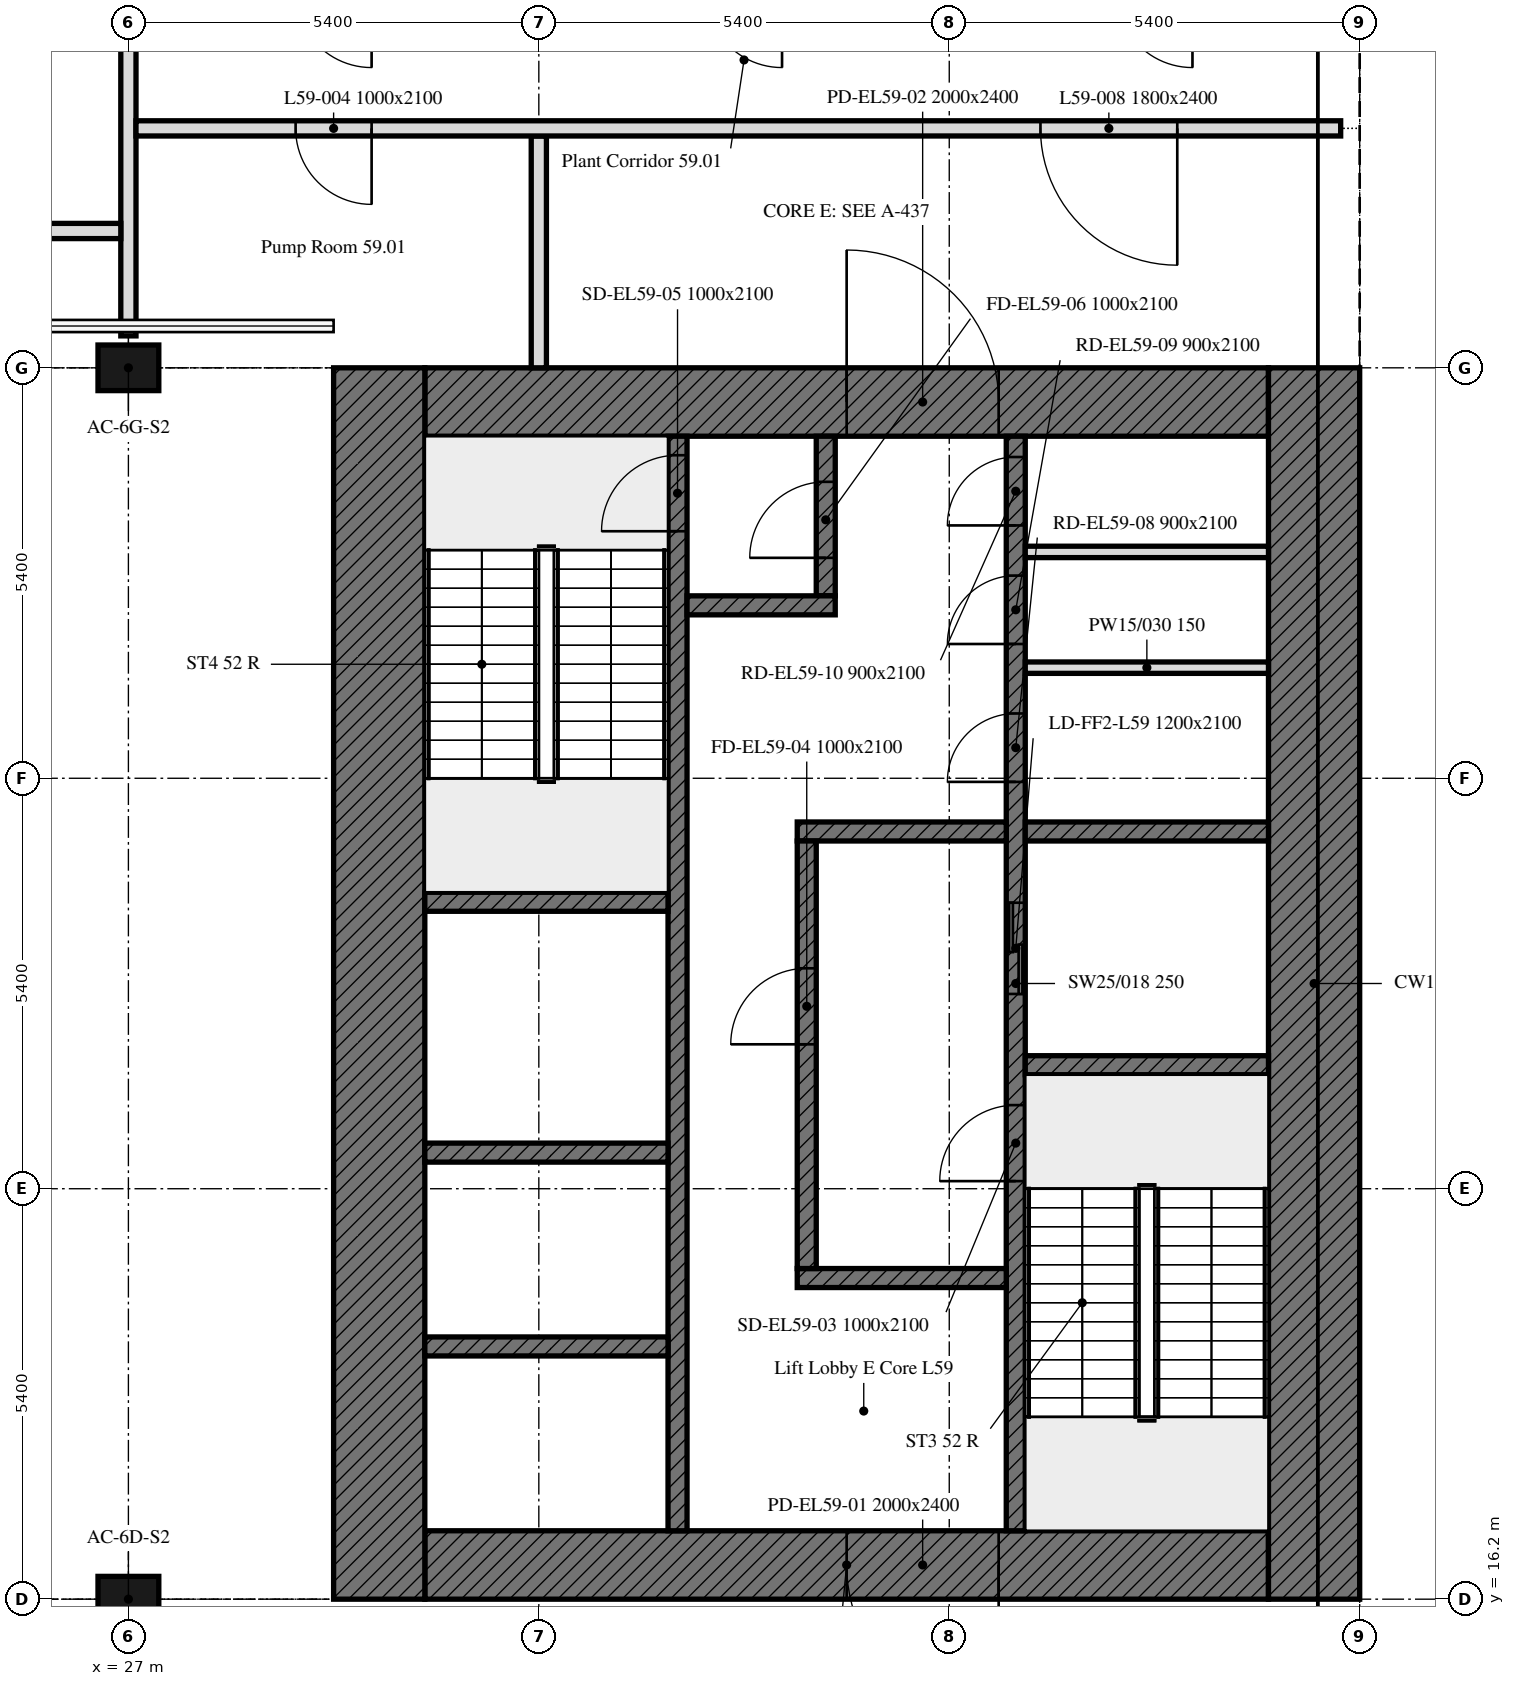
"""IFC4 building model, lengths in metres.
Left out: names, types, materials, properties, quantities, classifications, styles, units other than length and angle.
Written with IfcOpenShell. Run it as: python <this file> out.ifc"""

import sys

from ifc_helpers import new_model, si_unit, direction, frame, frame_2d, origin, origin_2d, place, context, subcontext, project, spatial, rectangle, extrude, element, fill, save


model = new_model("IFC4")
c1 = context("Model", 3, precision=1e-05, world=origin(), true_north=direction((0.0, 1.0)))
c2 = subcontext(c1, "Body", "Model", "MODEL_VIEW")
j1 = project(units=[si_unit("LENGTHUNIT", "METRE"), si_unit("PLANEANGLEUNIT", "RADIAN")], contexts=[c1])
p1 = place(None, origin())
s1 = spatial("IfcSite", under=j1, at=p1, CompositionType="ELEMENT")
p2 = place(p1, origin())
s2 = spatial("IfcBuilding", under=s1, at=p2, CompositionType="ELEMENT")
p3 = place(p2, frame((0.0, 0.0, 233.5)))
s3 = spatial("IfcBuildingStorey", under=s2, at=p3, CompositionType="ELEMENT", Elevation=233.5)
for number, where, z_axis, x_axis in (
    (1, (27.0, 16.2, 0.0), (0.0, 0.0, 1.0), (1.0, 0.0, 0.0)),
    (2, (27.0, 32.4, 0.0), (0.0, 0.0, 1.0), (1.0, 0.0, 0.0)),
):
    element("IfcColumn", number, at=place(p3, frame(where, z_axis=z_axis, x_axis=x_axis)), inside=s3, PredefinedType="COLUMN", context=c2, shape_type="SweptSolid", body=[
        extrude(rectangle(XDim=0.8, YDim=0.6, at=origin_2d()), origin(), (0.0, 0.0, 1.0), 9.3),
    ])
p4 = place(p3, frame((42.0, 16.65, 0.0), z_axis=(0.0, 0.0, 1.0), x_axis=(-1.0, 0.0, 0.0)))
e3 = element("IfcWall", 3, at=p4, inside=s3, PredefinedType="SOLIDWALL", context=c2, shape_type="SweptSolid", body=[
    extrude(rectangle(XDim=11.1, YDim=0.9, at=frame_2d((5.55, 0.0))), origin(), (0.0, 0.0, 1.0), 9.3),
])
p5 = place(p4, frame((3.55, 0.0, 0.0)))
e4 = element("IfcOpeningElement", 4, at=p5, cuts=e3, PredefinedType="OPENING", context=c2, shape_type="SweptSolid", body=[
    extrude(rectangle(XDim=2.0, YDim=2.4, at=frame_2d((1.0, 1.2))), frame((0.0, 0.45, 0.0), z_axis=(0.0, -1.0, 0.0), x_axis=(1.0, 0.0, 0.0)), (0.0, 0.0, 1.0), 0.9),
])
p6 = place(p3, frame((30.9, 31.95, 0.0), z_axis=(0.0, 0.0, 1.0), x_axis=(1.0, 0.0, 0.0)))
e5 = element("IfcWall", 5, at=p6, inside=s3, PredefinedType="SOLIDWALL", context=c2, shape_type="SweptSolid", body=[
    extrude(rectangle(XDim=11.1, YDim=0.9, at=frame_2d((5.55, 0.0))), origin(), (0.0, 0.0, 1.0), 9.3),
])
p7 = place(p6, frame((5.55, 0.0, 0.0)))
e6 = element("IfcOpeningElement", 6, at=p7, cuts=e5, PredefinedType="OPENING", context=c2, shape_type="SweptSolid", body=[
    extrude(rectangle(XDim=2.0, YDim=2.4, at=frame_2d((1.0, 1.2))), frame((0.0, 0.45, 0.0), z_axis=(0.0, -1.0, 0.0), x_axis=(1.0, 0.0, 0.0)), (0.0, 0.0, 1.0), 0.9),
])
for number, where, z_axis, x_axis in (
    (7, (42.6, 32.4, 0.0), (0.0, 0.0, 1.0), (0.0, -1.0, 0.0)),
    (8, (30.3, 16.2, 0.0), (0.0, 0.0, 1.0), (0.0, 1.0, 0.0)),
):
    element("IfcWall", number, at=place(p3, frame(where, z_axis=z_axis, x_axis=x_axis)), inside=s3, PredefinedType="SOLIDWALL", context=c2, shape_type="SweptSolid", body=[
        extrude(rectangle(XDim=16.2, YDim=1.2, at=frame_2d((8.1, 0.0))), origin(), (0.0, 0.0, 1.0), 9.3),
    ])
p8 = place(p3, frame((38.675, 17.1, 0.0), z_axis=(0.0, 0.0, 1.0), x_axis=(0.0, 1.0, 0.0)))
e9 = element("IfcWall", 9, at=p8, inside=s3, PredefinedType="SOLIDWALL", context=c2, shape_type="SweptSolid", body=[
    extrude(rectangle(XDim=14.4, YDim=0.25, at=frame_2d((7.2, 0.0))), origin(), (0.0, 0.0, 1.0), 9.3),
])
p9 = place(p8, frame((4.6, 0.0, 0.0)))
e10 = element("IfcOpeningElement", 10, at=p9, cuts=e9, PredefinedType="OPENING", context=c2, shape_type="SweptSolid", body=[
    extrude(rectangle(XDim=1.0, YDim=2.1, at=frame_2d((0.5, 1.05))), frame((0.0, 0.125, 0.0), z_axis=(0.0, -1.0, 0.0), x_axis=(1.0, 0.0, 0.0)), (0.0, 0.0, 1.0), 0.25),
])
p10 = place(p8, frame((7.062, 0.0, 0.0)))
e11 = element("IfcOpeningElement", 11, at=p10, cuts=e9, PredefinedType="OPENING", context=c2, shape_type="SweptSolid", body=[
    extrude(rectangle(XDim=1.2, YDim=2.1, at=frame_2d((0.6, 1.05))), frame((0.0, 0.125, 0.0), z_axis=(0.0, -1.0, 0.0), x_axis=(1.0, 0.0, 0.0)), (0.0, 0.0, 1.0), 0.25),
])
p11 = place(p8, frame((9.853, 0.0, 0.0)))
e12 = element("IfcOpeningElement", 12, at=p11, cuts=e9, PredefinedType="OPENING", context=c2, shape_type="SweptSolid", body=[
    extrude(rectangle(XDim=0.9, YDim=2.1, at=frame_2d((0.45, 1.05))), frame((0.0, 0.125, 0.0), z_axis=(0.0, -1.0, 0.0), x_axis=(1.0, 0.0, 0.0)), (0.0, 0.0, 1.0), 0.25),
])
p12 = place(p8, frame((11.667, 0.0, 0.0)))
e13 = element("IfcOpeningElement", 13, at=p12, cuts=e9, PredefinedType="OPENING", context=c2, shape_type="SweptSolid", body=[
    extrude(rectangle(XDim=0.9, YDim=2.1, at=frame_2d((0.45, 1.05))), frame((0.0, 0.125, 0.0), z_axis=(0.0, -1.0, 0.0), x_axis=(1.0, 0.0, 0.0)), (0.0, 0.0, 1.0), 0.25),
])
p13 = place(p8, frame((13.227, 0.0, 0.0)))
e14 = element("IfcOpeningElement", 14, at=p13, cuts=e9, PredefinedType="OPENING", context=c2, shape_type="SweptSolid", body=[
    extrude(rectangle(XDim=0.9, YDim=2.1, at=frame_2d((0.45, 1.05))), frame((0.0, 0.125, 0.0), z_axis=(0.0, -1.0, 0.0), x_axis=(1.0, 0.0, 0.0)), (0.0, 0.0, 1.0), 0.25),
])
p14 = place(p3, frame((34.225, 17.1, 0.0), z_axis=(0.0, 0.0, 1.0), x_axis=(0.0, 1.0, 0.0)))
e15 = element("IfcWall", 15, at=p14, inside=s3, PredefinedType="SOLIDWALL", context=c2, shape_type="SweptSolid", body=[
    extrude(rectangle(XDim=14.4, YDim=0.25, at=frame_2d((7.2, 0.0))), origin(), (0.0, 0.0, 1.0), 9.3),
])
p15 = place(p14, frame((13.15, 0.0, 0.0)))
e16 = element("IfcOpeningElement", 16, at=p15, cuts=e15, PredefinedType="OPENING", context=c2, shape_type="SweptSolid", body=[
    extrude(rectangle(XDim=1.0, YDim=2.1, at=frame_2d((0.5, 1.05))), frame((0.0, 0.125, 0.0), z_axis=(0.0, -1.0, 0.0), x_axis=(1.0, 0.0, 0.0)), (0.0, 0.0, 1.0), 0.25),
])
p16 = place(p3, frame((38.8, 23.225, 0.0), z_axis=(0.0, 0.0, 1.0), x_axis=(1.0, 0.0, 0.0)))
e17 = element("IfcWall", 17, at=p16, inside=s3, PredefinedType="SOLIDWALL", context=c2, shape_type="SweptSolid", body=[
    extrude(rectangle(XDim=3.2, YDim=0.25, at=frame_2d((1.6, 0.0))), origin(), (0.0, 0.0, 1.0), 9.3),
])
for number, where, z_axis, x_axis in (
    (18, (30.9, 25.375, 0.0), (0.0, 0.0, 1.0), (1.0, 0.0, 0.0)),
    (19, (30.9, 22.075, 0.0), (0.0, 0.0, 1.0), (1.0, 0.0, 0.0)),
):
    element("IfcWall", number, at=place(p3, frame(where, z_axis=z_axis, x_axis=x_axis)), inside=s3, PredefinedType="SOLIDWALL", context=c2, shape_type="SweptSolid", body=[
        extrude(rectangle(XDim=3.2, YDim=0.25, at=frame_2d((1.6, 0.0))), origin(), (0.0, 0.0, 1.0), 9.3),
    ])
p17 = place(p3, frame((38.8, 26.3, 0.0), z_axis=(0.0, 0.0, 1.0), x_axis=(1.0, 0.0, 0.0)))
e20 = element("IfcWall", 20, at=p17, inside=s3, PredefinedType="SOLIDWALL", context=c2, shape_type="SweptSolid", body=[
    extrude(rectangle(XDim=3.2, YDim=0.25, at=frame_2d((1.6, 0.0))), origin(), (0.0, 0.0, 1.0), 9.3),
])
for number, where, z_axis, x_axis in (
    (21, (35.8, 26.3, 0.0), (0.0, 0.0, 1.0), (1.0, 0.0, 0.0)),
    (22, (35.8, 20.425, 0.0), (0.0, 0.0, 1.0), (1.0, 0.0, 0.0)),
):
    element("IfcWall", number, at=place(p3, frame(where, z_axis=z_axis, x_axis=x_axis)), inside=s3, PredefinedType="SOLIDWALL", context=c2, shape_type="SweptSolid", body=[
        extrude(rectangle(XDim=2.75, YDim=0.25, at=frame_2d((1.375, 0.0))), origin(), (0.0, 0.0, 1.0), 9.3),
    ])
p18 = place(p3, frame((36.175, 29.4, 0.0), z_axis=(0.0, 0.0, 1.0), x_axis=(0.0, 1.0, 0.0)))
e23 = element("IfcWall", 23, at=p18, inside=s3, PredefinedType="SOLIDWALL", context=c2, shape_type="SweptSolid", body=[
    extrude(rectangle(XDim=2.1, YDim=0.25, at=frame_2d((1.05, 0.0))), origin(), (0.0, 0.0, 1.0), 9.3),
])
p19 = place(p18, frame((0.5, 0.0, 0.0)))
e24 = element("IfcOpeningElement", 24, at=p19, cuts=e23, PredefinedType="OPENING", context=c2, shape_type="SweptSolid", body=[
    extrude(rectangle(XDim=1.0, YDim=2.1, at=frame_2d((0.5, 1.05))), frame((0.0, 0.125, 0.0), z_axis=(0.0, -1.0, 0.0), x_axis=(1.0, 0.0, 0.0)), (0.0, 0.0, 1.0), 0.25),
])
p20 = place(p3, frame((34.35, 29.275, 0.0), z_axis=(0.0, 0.0, 1.0), x_axis=(1.0, 0.0, 0.0)))
e25 = element("IfcWall", 25, at=p20, inside=s3, PredefinedType="SOLIDWALL", context=c2, shape_type="SweptSolid", body=[
    extrude(rectangle(XDim=1.95, YDim=0.25, at=frame_2d((0.975, 0.0))), origin(), (0.0, 0.0, 1.0), 9.3),
])
p21 = place(p3, frame((35.925, 20.55, 0.0), z_axis=(0.0, 0.0, 1.0), x_axis=(0.0, 1.0, 0.0)))
e26 = element("IfcWall", 26, at=p21, inside=s3, PredefinedType="SOLIDWALL", context=c2, shape_type="SweptSolid", body=[
    extrude(rectangle(XDim=5.625, YDim=0.25, at=frame_2d((2.812, 0.0))), origin(), (0.0, 0.0, 1.0), 9.3),
])
p22 = place(p21, frame((2.95, 0.0, 0.0)))
e27 = element("IfcOpeningElement", 27, at=p22, cuts=e26, PredefinedType="OPENING", context=c2, shape_type="SweptSolid", body=[
    extrude(rectangle(XDim=1.0, YDim=2.1, at=frame_2d((0.5, 1.05))), frame((0.0, 0.125, 0.0), z_axis=(0.0, -1.0, 0.0), x_axis=(1.0, 0.0, 0.0)), (0.0, 0.0, 1.0), 0.25),
])
p23 = place(p3, frame((30.9, 19.525, 0.0), z_axis=(0.0, 0.0, 1.0), x_axis=(1.0, 0.0, 0.0)))
e28 = element("IfcWall", 28, at=p23, inside=s3, PredefinedType="SOLIDWALL", context=c2, shape_type="SweptSolid", body=[
    extrude(rectangle(XDim=3.2, YDim=0.25, at=frame_2d((1.6, 0.0))), origin(), (0.0, 0.0, 1.0), 9.3),
])
for number, where, z_axis, x_axis in (
    (29, (38.8, 28.455, 0.0), (0.0, 0.0, 1.0), (1.0, 0.0, 0.0)),
    (30, (38.8, 29.978, 0.0), (0.0, 0.0, 1.0), (1.0, 0.0, 0.0)),
):
    element("IfcWall", number, at=place(p3, frame(where, z_axis=z_axis, x_axis=x_axis)), inside=s3, PredefinedType="PARTITIONING", context=c2, shape_type="SweptSolid", body=[
        extrude(rectangle(XDim=3.2, YDim=0.15, at=frame_2d((1.6, 0.0))), origin(), (0.0, 0.0, 1.0), 9.3),
    ])
p24 = place(p3, frame((32.4, 32.4, 0.0), z_axis=(0.0, 0.0, 1.0), x_axis=(0.0, 1.0, 0.0)))
e31 = element("IfcWall", 31, at=p24, inside=s3, PredefinedType="PARTITIONING", context=c2, shape_type="SweptSolid", body=[
    extrude(rectangle(XDim=3.05, YDim=0.2, at=frame_2d((1.525, 0.0))), origin(), (0.0, 0.0, 1.0), 9.3),
])
p25 = place(p3, frame((27.0, 37.25, 0.0), z_axis=(0.0, 0.0, 1.0), x_axis=(0.0, -1.0, 0.0)))
e32 = element("IfcWall", 32, at=p25, inside=s3, PredefinedType="PARTITIONING", context=c2, shape_type="SweptSolid", body=[
    extrude(rectangle(XDim=4.43, YDim=0.2, at=frame_2d((2.215, 0.0))), origin(), (0.0, 0.0, 1.0), 9.3),
])
p26 = place(p3, frame((42.95, 35.55, 0.0), z_axis=(0.0, 0.0, 1.0), x_axis=(-1.0, 0.0, 0.0)))
e33 = element("IfcWall", 33, at=p26, inside=s3, PredefinedType="PARTITIONING", context=c2, shape_type="SweptSolid", body=[
    extrude(rectangle(XDim=15.85, YDim=0.2, at=frame_2d((7.925, 0.0))), origin(), (0.0, 0.0, 1.0), 9.3),
])
p27 = place(p26, frame((12.75, 0.0, 0.0)))
e34 = element("IfcOpeningElement", 34, at=p27, cuts=e33, PredefinedType="OPENING", context=c2, shape_type="SweptSolid", body=[
    extrude(rectangle(XDim=1.0, YDim=2.1, at=frame_2d((0.5, 1.05))), frame((0.0, 0.1, 0.0), z_axis=(0.0, -1.0, 0.0), x_axis=(1.0, 0.0, 0.0)), (0.0, 0.0, 1.0), 0.2),
])
p28 = place(p26, frame((2.15, 0.0, 0.0)))
e35 = element("IfcOpeningElement", 35, at=p28, cuts=e33, PredefinedType="OPENING", context=c2, shape_type="SweptSolid", body=[
    extrude(rectangle(XDim=1.8, YDim=2.4, at=frame_2d((0.9, 1.2))), frame((0.0, 0.1, 0.0), z_axis=(0.0, -1.0, 0.0), x_axis=(1.0, 0.0, 0.0)), (0.0, 0.0, 1.0), 0.2),
])
p29 = place(p3, frame((26.9, 34.2, 0.0), z_axis=(0.0, 0.0, 1.0), x_axis=(-1.0, 0.0, 0.0)))
e36 = element("IfcWall", 36, at=p29, inside=s3, PredefinedType="PARTITIONING", context=c2, shape_type="SweptSolid", body=[
    extrude(rectangle(XDim=26.42, YDim=0.2, at=frame_2d((13.21, 0.0))), origin(), (0.0, 0.0, 1.0), 9.3),
])
p30 = place(p29, frame((22.925, 0.0, 0.0)))
e37 = element("IfcOpeningElement", 37, at=p30, cuts=e36, PredefinedType="OPENING", context=c2, shape_type="SweptSolid", body=[
    extrude(rectangle(XDim=1.8, YDim=2.4, at=frame_2d((0.9, 1.2))), frame((0.0, 0.1, 0.0), z_axis=(0.0, -1.0, 0.0), x_axis=(1.0, 0.0, 0.0)), (0.0, 0.0, 1.0), 0.2),
])
p31 = place(p29, frame((9.8, 0.0, 0.0)))
e38 = element("IfcOpeningElement", 38, at=p31, cuts=e36, PredefinedType="OPENING", context=c2, shape_type="SweptSolid", body=[
    extrude(rectangle(XDim=1.8, YDim=2.4, at=frame_2d((0.9, 1.2))), frame((0.0, 0.1, 0.0), z_axis=(0.0, -1.0, 0.0), x_axis=(1.0, 0.0, 0.0)), (0.0, 0.0, 1.0), 0.2),
])
p32 = place(p5, origin())
e39 = element("IfcDoor", 39, at=p32, inside=s3, OperationType="DOUBLE_DOOR_SINGLE_SWING", PredefinedType="DOOR", context=c2, shape_type="SweptSolid", body=[
    extrude(rectangle(XDim=2.0, YDim=2.4, at=frame_2d((1.0, 1.2))), frame((0.0, 0.025, 0.0), z_axis=(0.0, -1.0, 0.0), x_axis=(1.0, 0.0, 0.0)), (0.0, 0.0, 1.0), 0.05),
])
fill(e4, e39)
p33 = place(p7, origin())
e40 = element("IfcDoor", 40, at=p33, inside=s3, OperationType="DOUBLE_DOOR_SINGLE_SWING", PredefinedType="DOOR", context=c2, shape_type="SweptSolid", body=[
    extrude(rectangle(XDim=2.0, YDim=2.4, at=frame_2d((1.0, 1.2))), frame((0.0, 0.025, 0.0), z_axis=(0.0, -1.0, 0.0), x_axis=(1.0, 0.0, 0.0)), (0.0, 0.0, 1.0), 0.05),
])
fill(e6, e40)
p34 = place(p9, origin())
e41 = element("IfcDoor", 41, at=p34, inside=s3, OperationType="SINGLE_SWING_LEFT", PredefinedType="DOOR", context=c2, shape_type="SweptSolid", body=[
    extrude(rectangle(XDim=1.0, YDim=2.1, at=frame_2d((0.5, 1.05))), frame((0.0, 0.025, 0.0), z_axis=(0.0, -1.0, 0.0), x_axis=(1.0, 0.0, 0.0)), (0.0, 0.0, 1.0), 0.05),
])
fill(e10, e41)
p35 = place(p22, origin())
e42 = element("IfcDoor", 42, at=p35, inside=s3, OperationType="SINGLE_SWING_LEFT", PredefinedType="DOOR", context=c2, shape_type="SweptSolid", body=[
    extrude(rectangle(XDim=1.0, YDim=2.1, at=frame_2d((0.5, 1.05))), frame((0.0, 0.025, 0.0), z_axis=(0.0, -1.0, 0.0), x_axis=(1.0, 0.0, 0.0)), (0.0, 0.0, 1.0), 0.05),
])
fill(e27, e42)
p36 = place(p15, origin())
e43 = element("IfcDoor", 43, at=p36, inside=s3, OperationType="SINGLE_SWING_LEFT", PredefinedType="DOOR", context=c2, shape_type="SweptSolid", body=[
    extrude(rectangle(XDim=1.0, YDim=2.1, at=frame_2d((0.5, 1.05))), frame((0.0, 0.025, 0.0), z_axis=(0.0, -1.0, 0.0), x_axis=(1.0, 0.0, 0.0)), (0.0, 0.0, 1.0), 0.05),
])
fill(e16, e43)
p37 = place(p19, origin())
e44 = element("IfcDoor", 44, at=p37, inside=s3, OperationType="SINGLE_SWING_LEFT", PredefinedType="DOOR", context=c2, shape_type="SweptSolid", body=[
    extrude(rectangle(XDim=1.0, YDim=2.1, at=frame_2d((0.5, 1.05))), frame((0.0, 0.025, 0.0), z_axis=(0.0, -1.0, 0.0), x_axis=(1.0, 0.0, 0.0)), (0.0, 0.0, 1.0), 0.05),
])
fill(e24, e44)
p38 = place(p10, origin())
e45 = element("IfcDoor", 45, at=p38, inside=s3, OperationType="DOUBLE_DOOR_SLIDING", PredefinedType="DOOR", context=c2, shape_type="SweptSolid", body=[
    extrude(rectangle(XDim=1.2, YDim=2.1, at=frame_2d((0.6, 1.05))), frame((0.0, 0.025, 0.0), z_axis=(0.0, -1.0, 0.0), x_axis=(1.0, 0.0, 0.0)), (0.0, 0.0, 1.0), 0.05),
])
fill(e11, e45)
p39 = place(p11, origin())
e46 = element("IfcDoor", 46, at=p39, inside=s3, OperationType="SINGLE_SWING_LEFT", PredefinedType="DOOR", context=c2, shape_type="SweptSolid", body=[
    extrude(rectangle(XDim=0.9, YDim=2.1, at=frame_2d((0.45, 1.05))), frame((0.0, 0.025, 0.0), z_axis=(0.0, -1.0, 0.0), x_axis=(1.0, 0.0, 0.0)), (0.0, 0.0, 1.0), 0.05),
])
fill(e12, e46)
p40 = place(p12, origin())
e47 = element("IfcDoor", 47, at=p40, inside=s3, OperationType="SINGLE_SWING_LEFT", PredefinedType="DOOR", context=c2, shape_type="SweptSolid", body=[
    extrude(rectangle(XDim=0.9, YDim=2.1, at=frame_2d((0.45, 1.05))), frame((0.0, 0.025, 0.0), z_axis=(0.0, -1.0, 0.0), x_axis=(1.0, 0.0, 0.0)), (0.0, 0.0, 1.0), 0.05),
])
fill(e13, e47)
p41 = place(p13, origin())
e48 = element("IfcDoor", 48, at=p41, inside=s3, OperationType="SINGLE_SWING_LEFT", PredefinedType="DOOR", context=c2, shape_type="SweptSolid", body=[
    extrude(rectangle(XDim=0.9, YDim=2.1, at=frame_2d((0.45, 1.05))), frame((0.0, 0.025, 0.0), z_axis=(0.0, -1.0, 0.0), x_axis=(1.0, 0.0, 0.0)), (0.0, 0.0, 1.0), 0.05),
])
fill(e14, e48)
p42 = place(p27, origin())
e49 = element("IfcDoor", 49, at=p42, inside=s3, OperationType="SINGLE_SWING_LEFT", PredefinedType="DOOR", context=c2, shape_type="SweptSolid", body=[
    extrude(rectangle(XDim=1.0, YDim=2.1, at=frame_2d((0.5, 1.05))), frame((0.0, 0.025, 0.0), z_axis=(0.0, -1.0, 0.0), x_axis=(1.0, 0.0, 0.0)), (0.0, 0.0, 1.0), 0.05),
])
fill(e34, e49)
p43 = place(p28, origin())
e50 = element("IfcDoor", 50, at=p43, inside=s3, OperationType="DOUBLE_DOOR_SINGLE_SWING", PredefinedType="DOOR", context=c2, shape_type="SweptSolid", body=[
    extrude(rectangle(XDim=1.8, YDim=2.4, at=frame_2d((0.9, 1.2))), frame((0.0, 0.025, 0.0), z_axis=(0.0, -1.0, 0.0), x_axis=(1.0, 0.0, 0.0)), (0.0, 0.0, 1.0), 0.05),
])
fill(e35, e50)
save(model, sys.argv[1])
